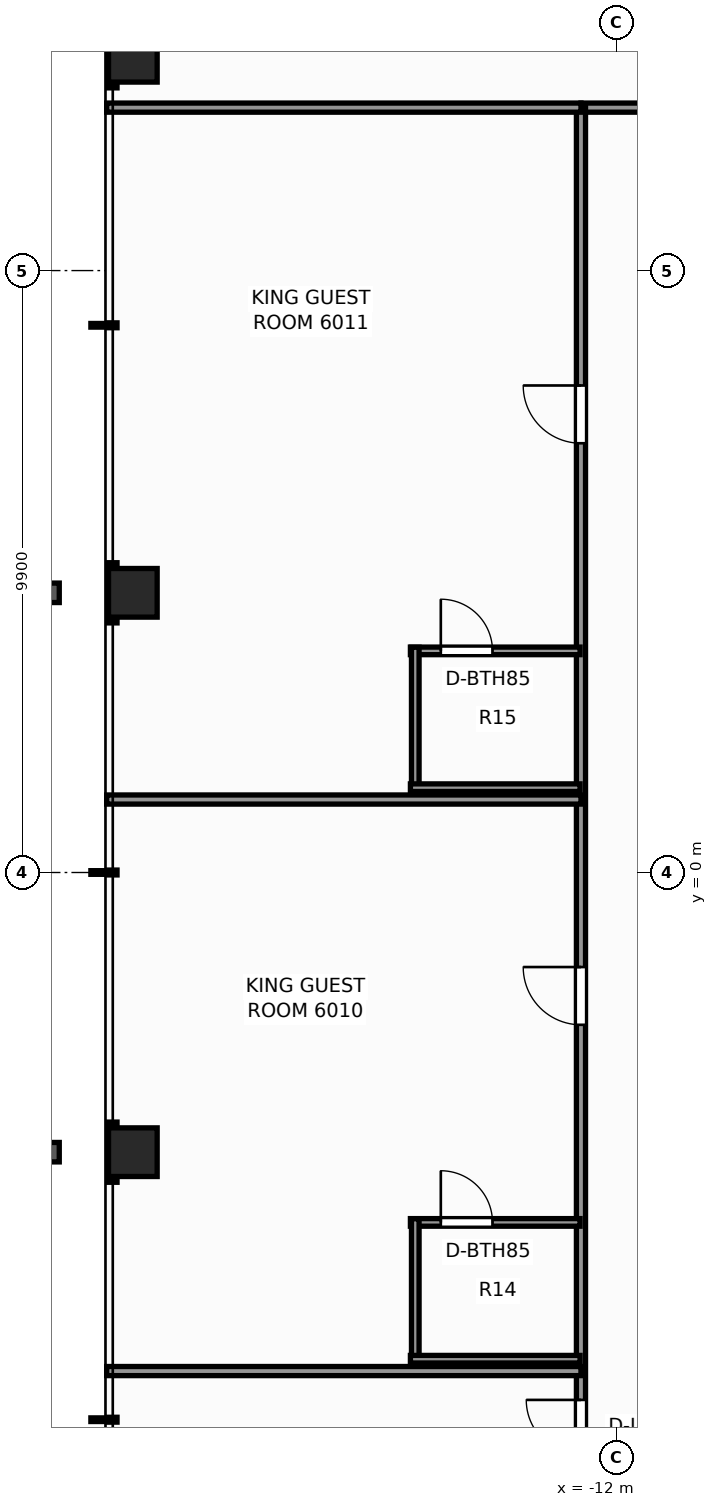
"""IFC4 building model, lengths in metres.
Left out: names, types, materials, properties, quantities, classifications, styles, units other than length and angle.
Written with IfcOpenShell. Run it as: python <this file> out.ifc"""

import sys

from ifc_helpers import new_model, si_unit, direction, frame, frame_2d, origin, origin_2d, place, context, subcontext, project, spatial, rectangle, extrude, element, fill, save


model = new_model("IFC4")
c1 = context("Model", 3, precision=1e-05, world=origin(), true_north=direction((0.0, 1.0)))
c2 = subcontext(c1, "Body", "Model", "MODEL_VIEW")
j1 = project(units=[si_unit("LENGTHUNIT", "METRE"), si_unit("PLANEANGLEUNIT", "RADIAN")], contexts=[c1])
p1 = place(None, origin())
s1 = spatial("IfcSite", under=j1, at=p1, CompositionType="ELEMENT")
p2 = place(p1, origin())
s2 = spatial("IfcBuilding", under=s1, at=p2, CompositionType="ELEMENT")
p3 = place(p2, frame((0.0, 0.0, 206.4)))
s3 = spatial("IfcBuildingStorey", under=s2, at=p3, CompositionType="ELEMENT", Elevation=206.4)
for number, where, z_axis, x_axis in (
    (1, (-19.95, -4.6, 0.0), (0.0, 0.0, 1.0), (1.0, 0.0, 0.0)),
    (2, (-19.95, 4.6, 0.0), (0.0, 0.0, 1.0), (1.0, 0.0, 0.0)),
    (3, (-19.95, 13.4, 0.0), (0.0, 0.0, 1.0), (1.0, 0.0, 0.0)),
):
    element("IfcColumn", number, at=place(p3, frame(where, z_axis=z_axis, x_axis=x_axis)), inside=s3, PredefinedType="COLUMN", context=c2, shape_type="SweptSolid", body=[
        extrude(rectangle(XDim=0.8, YDim=0.8, at=origin_2d()), origin(), (0.0, 0.0, 1.0), 3.3),
    ])
p4 = place(p3, frame((-12.58, 12.58, 0.0), z_axis=(0.0, 0.0, 1.0), x_axis=(1.0, 0.0, 0.0)))
e4 = element("IfcWall", 4, at=p4, inside=s3, PredefinedType="PARTITIONING", context=c2, shape_type="SweptSolid", body=[
    extrude(rectangle(XDim=25.16, YDim=0.15, at=frame_2d((12.58, 0.0))), origin(), (0.0, 0.0, 1.0), 2.369),
])
p5 = place(p4, frame((4.595, 0.0, 0.0)))
e5 = element("IfcOpeningElement", 5, at=p5, cuts=e4, PredefinedType="OPENING", context=c2, shape_type="SweptSolid", body=[
    extrude(rectangle(XDim=0.9, YDim=2.06, at=frame_2d((0.45, 1.03))), frame((0.0, 0.085, 0.0), z_axis=(0.0, -1.0, 0.0), x_axis=(1.0, 0.0, 0.0)), (0.0, 0.0, 1.0), 0.17),
])
p6 = place(p4, frame((19.665, 0.0, 0.0)))
e6 = element("IfcOpeningElement", 6, at=p6, cuts=e4, PredefinedType="OPENING", context=c2, shape_type="SweptSolid", body=[
    extrude(rectangle(XDim=0.9, YDim=2.06, at=frame_2d((0.45, 1.03))), frame((0.0, 0.085, 0.0), z_axis=(0.0, -1.0, 0.0), x_axis=(1.0, 0.0, 0.0)), (0.0, 0.0, 1.0), 0.17),
])
p7 = place(p3, frame((-12.58, -12.26, 0.0), z_axis=(0.0, 0.0, 1.0), x_axis=(0.0, 1.0, 0.0)))
e7 = element("IfcWall", 7, at=p7, inside=s3, PredefinedType="PARTITIONING", context=c2, shape_type="SweptSolid", body=[
    extrude(rectangle(XDim=24.84, YDim=0.15, at=frame_2d((12.42, 0.0))), origin(), (0.0, 0.0, 1.0), 2.369),
])
p8 = place(p7, frame((2.686, 0.0, 0.0)))
e8 = element("IfcOpeningElement", 8, at=p8, cuts=e7, PredefinedType="OPENING", context=c2, shape_type="SweptSolid", body=[
    extrude(rectangle(XDim=0.9, YDim=2.06, at=frame_2d((0.45, 1.03))), frame((0.0, 0.085, 0.0), z_axis=(0.0, -1.0, 0.0), x_axis=(1.0, 0.0, 0.0)), (0.0, 0.0, 1.0), 0.17),
])
p9 = place(p7, frame((9.755, 0.0, 0.0)))
e9 = element("IfcOpeningElement", 9, at=p9, cuts=e7, PredefinedType="OPENING", context=c2, shape_type="SweptSolid", body=[
    extrude(rectangle(XDim=0.95, YDim=2.06, at=frame_2d((0.475, 1.03))), frame((0.0, 0.085, 0.0), z_axis=(0.0, -1.0, 0.0), x_axis=(1.0, 0.0, 0.0)), (0.0, 0.0, 1.0), 0.17),
])
p10 = place(p7, frame((19.32, 0.0, 0.0)))
e10 = element("IfcOpeningElement", 10, at=p10, cuts=e7, PredefinedType="OPENING", context=c2, shape_type="SweptSolid", body=[
    extrude(rectangle(XDim=0.95, YDim=2.06, at=frame_2d((0.475, 1.03))), frame((0.0, 0.085, 0.0), z_axis=(0.0, -1.0, 0.0), x_axis=(1.0, 0.0, 0.0)), (0.0, 0.0, 1.0), 0.17),
])
p11 = place(p3, frame((-20.38, 12.58, 0.0), z_axis=(0.0, 0.0, 1.0), x_axis=(1.0, 0.0, 0.0)))
e11 = element("IfcWall", 11, at=p11, inside=s3, PredefinedType="PARTITIONING", context=c2, shape_type="SweptSolid", body=[
    extrude(rectangle(XDim=7.8, YDim=0.15, at=frame_2d((3.9, 0.0))), origin(), (0.0, 0.0, 1.0), 2.369),
])
for number, where, z_axis, x_axis in (
    (12, (-20.38, -8.2, 0.0), (0.0, 0.0, 1.0), (1.0, 0.0, 0.0)),
    (13, (-20.38, 1.2, 0.0), (0.0, 0.0, 1.0), (1.0, 0.0, 0.0)),
):
    element("IfcWall", number, at=place(p3, frame(where, z_axis=z_axis, x_axis=x_axis)), inside=s3, PredefinedType="PARTITIONING", context=c2, shape_type="SweptSolid", body=[
        extrude(rectangle(XDim=7.8, YDim=0.15, at=frame_2d((3.9, 0.0))), origin(), (0.0, 0.0, 1.0), 2.453),
    ])
p12 = place(p3, frame((-15.385, -5.755, 0.0), z_axis=(0.0, 0.0, 1.0), x_axis=(1.0, 0.0, 0.0)))
e14 = element("IfcWall", 14, at=p12, inside=s3, PredefinedType="PARTITIONING", context=c2, shape_type="SweptSolid", body=[
    extrude(rectangle(XDim=2.79, YDim=0.125, at=frame_2d((1.395, 0.0))), origin(), (0.0, 0.0, 1.0), 3.08),
])
p13 = place(p12, frame((0.5, 0.0, 0.0)))
e15 = element("IfcOpeningElement", 15, at=p13, cuts=e14, PredefinedType="OPENING", context=c2, shape_type="SweptSolid", body=[
    extrude(rectangle(XDim=0.85, YDim=2.03, at=frame_2d((0.425, 1.015))), frame((0.0, 0.073, 0.0), z_axis=(0.0, -1.0, 0.0), x_axis=(1.0, 0.0, 0.0)), (0.0, 0.0, 1.0), 0.145),
])
p14 = place(p3, frame((-15.305, -8.065, 0.0), z_axis=(0.0, 0.0, 1.0), x_axis=(0.0, 1.0, 0.0)))
e16 = element("IfcWall", 16, at=p14, inside=s3, PredefinedType="PARTITIONING", context=c2, shape_type="SweptSolid", body=[
    extrude(rectangle(XDim=2.37, YDim=0.125, at=frame_2d((1.185, 0.0))), origin(), (0.0, 0.0, 1.0), 3.08),
])
p15 = place(p3, frame((-15.385, -8.005, 0.0), z_axis=(0.0, 0.0, 1.0), x_axis=(1.0, 0.0, 0.0)))
e17 = element("IfcWall", 17, at=p15, inside=s3, PredefinedType="PARTITIONING", context=c2, shape_type="SweptSolid", body=[
    extrude(rectangle(XDim=2.79, YDim=0.125, at=frame_2d((1.395, 0.0))), origin(), (0.0, 0.0, 1.0), 3.08),
])
p16 = place(p3, frame((-15.385, 3.645, 0.0), z_axis=(0.0, 0.0, 1.0), x_axis=(1.0, 0.0, 0.0)))
e18 = element("IfcWall", 18, at=p16, inside=s3, PredefinedType="PARTITIONING", context=c2, shape_type="SweptSolid", body=[
    extrude(rectangle(XDim=2.79, YDim=0.125, at=frame_2d((1.395, 0.0))), origin(), (0.0, 0.0, 1.0), 3.08),
])
p17 = place(p16, frame((0.5, 0.0, 0.0)))
e19 = element("IfcOpeningElement", 19, at=p17, cuts=e18, PredefinedType="OPENING", context=c2, shape_type="SweptSolid", body=[
    extrude(rectangle(XDim=0.85, YDim=2.03, at=frame_2d((0.425, 1.015))), frame((0.0, 0.073, 0.0), z_axis=(0.0, -1.0, 0.0), x_axis=(1.0, 0.0, 0.0)), (0.0, 0.0, 1.0), 0.145),
])
p18 = place(p3, frame((-15.305, 1.335, 0.0), z_axis=(0.0, 0.0, 1.0), x_axis=(0.0, 1.0, 0.0)))
e20 = element("IfcWall", 20, at=p18, inside=s3, PredefinedType="PARTITIONING", context=c2, shape_type="SweptSolid", body=[
    extrude(rectangle(XDim=2.37, YDim=0.125, at=frame_2d((1.185, 0.0))), origin(), (0.0, 0.0, 1.0), 2.369),
])
p19 = place(p3, frame((-15.385, 1.395, 0.0), z_axis=(0.0, 0.0, 1.0), x_axis=(1.0, 0.0, 0.0)))
e21 = element("IfcWall", 21, at=p19, inside=s3, PredefinedType="PARTITIONING", context=c2, shape_type="SweptSolid", body=[
    extrude(rectangle(XDim=2.79, YDim=0.125, at=frame_2d((1.395, 0.0))), origin(), (0.0, 0.0, 1.0), 3.08),
])
p20 = place(p8, origin())
e22 = element("IfcDoor", 22, at=p20, inside=s3, OperationType="SINGLE_SWING_RIGHT", PredefinedType="DOOR", context=c2, shape_type="SweptSolid", body=[
    extrude(rectangle(XDim=0.9, YDim=2.06, at=frame_2d((0.45, 1.03))), frame((0.0, 0.025, 0.0), z_axis=(0.0, -1.0, 0.0), x_axis=(1.0, 0.0, 0.0)), (0.0, 0.0, 1.0), 0.05),
])
fill(e8, e22)
p21 = place(p13, origin())
e23 = element("IfcDoor", 23, at=p21, inside=s3, OperationType="SINGLE_SWING_LEFT", PredefinedType="DOOR", context=c2, shape_type="SweptSolid", body=[
    extrude(rectangle(XDim=0.85, YDim=2.03, at=frame_2d((0.425, 1.015))), frame((0.0, 0.025, 0.0), z_axis=(0.0, -1.0, 0.0), x_axis=(1.0, 0.0, 0.0)), (0.0, 0.0, 1.0), 0.05),
])
fill(e15, e23)
p22 = place(p9, origin())
e24 = element("IfcDoor", 24, at=p22, inside=s3, OperationType="SINGLE_SWING_RIGHT", PredefinedType="DOOR", context=c2, shape_type="SweptSolid", body=[
    extrude(rectangle(XDim=0.95, YDim=2.06, at=frame_2d((0.475, 1.03))), frame((0.0, 0.025, 0.0), z_axis=(0.0, -1.0, 0.0), x_axis=(1.0, 0.0, 0.0)), (0.0, 0.0, 1.0), 0.05),
])
fill(e9, e24)
p23 = place(p17, origin())
e25 = element("IfcDoor", 25, at=p23, inside=s3, OperationType="SINGLE_SWING_LEFT", PredefinedType="DOOR", context=c2, shape_type="SweptSolid", body=[
    extrude(rectangle(XDim=0.85, YDim=2.03, at=frame_2d((0.425, 1.015))), frame((0.0, 0.025, 0.0), z_axis=(0.0, -1.0, 0.0), x_axis=(1.0, 0.0, 0.0)), (0.0, 0.0, 1.0), 0.05),
])
fill(e19, e25)
p24 = place(p10, origin())
e26 = element("IfcDoor", 26, at=p24, inside=s3, OperationType="SINGLE_SWING_RIGHT", PredefinedType="DOOR", context=c2, shape_type="SweptSolid", body=[
    extrude(rectangle(XDim=0.95, YDim=2.06, at=frame_2d((0.475, 1.03))), frame((0.0, 0.025, 0.0), z_axis=(0.0, -1.0, 0.0), x_axis=(1.0, 0.0, 0.0)), (0.0, 0.0, 1.0), 0.05),
])
fill(e10, e26)
save(model, sys.argv[1])
